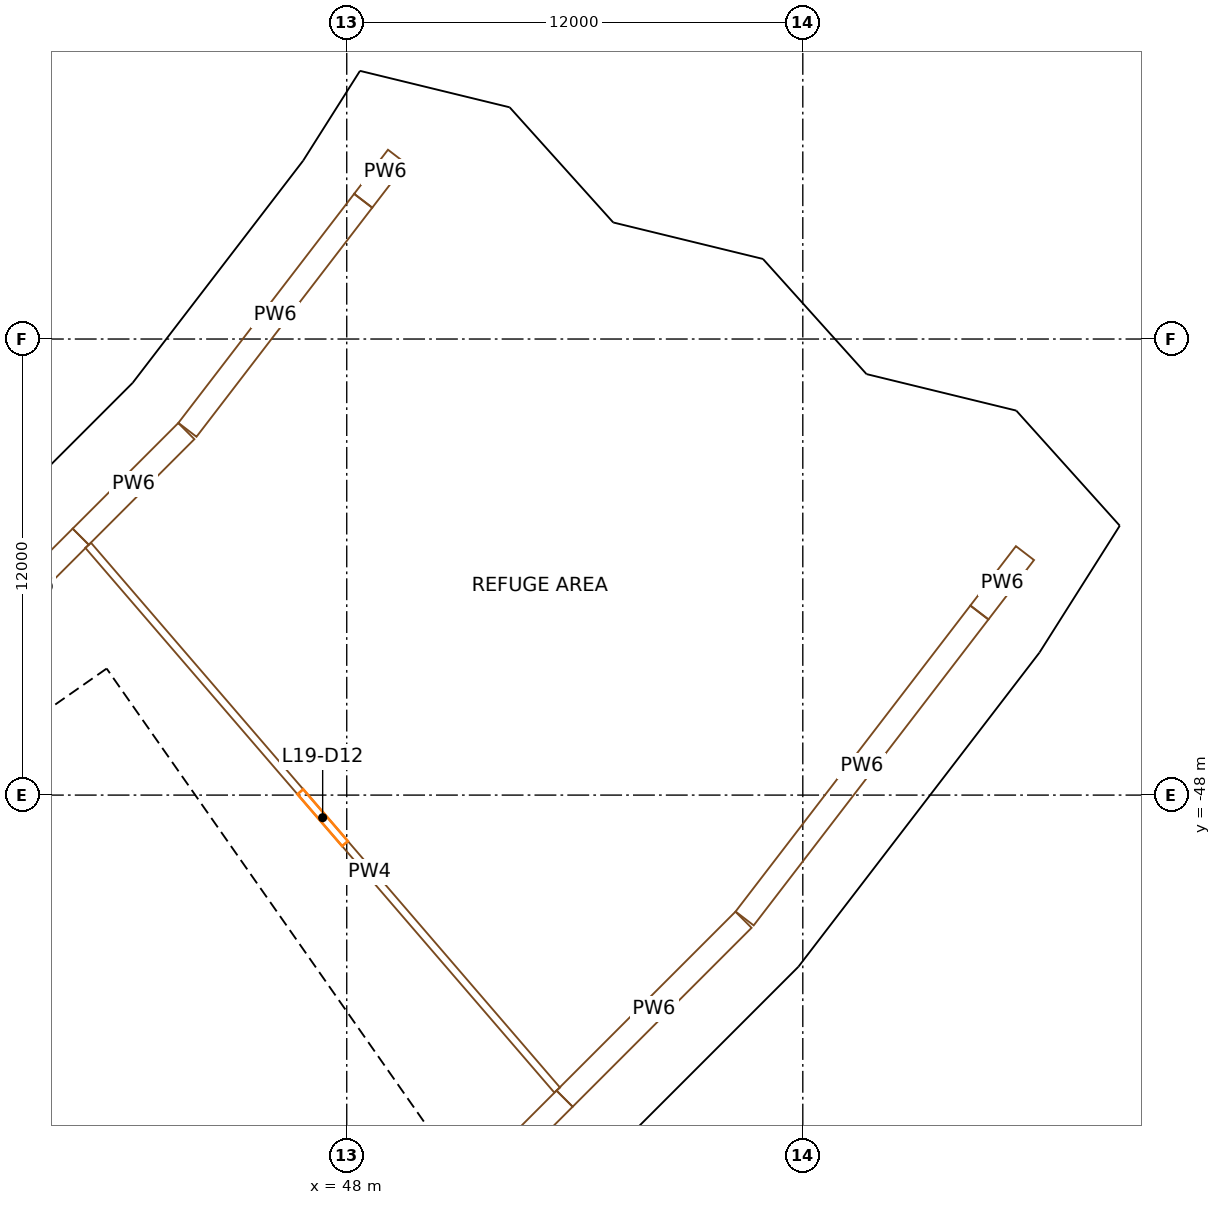
"""IFC4 building model, lengths in metres.
Left out: names, types, materials, properties, quantities, classifications, styles, units other than length and angle.
Written with IfcOpenShell. Run it as: python <this file> out.ifc"""

import sys

from ifc_helpers import new_model, si_unit, direction, frame, frame_2d, origin, origin_2d, place, context, subcontext, project, spatial, rectangle, extrude, element, fill, save


model = new_model("IFC4")
c1 = context("Model", 3, precision=1e-05, world=origin(), true_north=direction((0.0, 1.0)))
c2 = subcontext(c1, "Body", "Model", "MODEL_VIEW")
j1 = project(units=[si_unit("LENGTHUNIT", "METRE"), si_unit("PLANEANGLEUNIT", "RADIAN")], contexts=[c1])
p1 = place(None, origin())
s1 = spatial("IfcSite", under=j1, at=p1, CompositionType="ELEMENT")
p2 = place(p1, origin())
s2 = spatial("IfcBuilding", under=s1, at=p2, CompositionType="ELEMENT")
p3 = place(p2, frame((0.0, 0.0, 89.9)))
s3 = spatial("IfcBuildingStorey", under=s2, at=p3, CompositionType="ELEMENT", Elevation=89.9)
for number, where, z_axis, x_axis in (
    (1, (43.795, -38.407, 0.0), (0.0, 0.0, 1.0), (0.659, 0.752, 0.0)),
    (2, (58.456, -51.264, 0.0), (0.0, 0.0, 1.0), (0.659, 0.752, 0.0)),
    (3, (48.433, -32.362, 0.0), (0.0, 0.0, 1.0), (0.556, 0.831, 0.0)),
    (4, (64.647, -43.196, 0.0), (0.0, 0.0, 1.0), (0.556, 0.831, 0.0)),
):
    element("IfcColumn", number, at=place(p3, frame(where, z_axis=z_axis, x_axis=x_axis)), inside=s3, PredefinedType="COLUMN", context=c2, shape_type="SweptSolid", body=[
        extrude(rectangle(XDim=1.3, YDim=1.7, at=origin_2d()), origin(), (0.0, 0.0, 1.0), 5.0),
    ])
p4 = place(p3, frame((49.779, -57.191, 0.0), z_axis=(0.0, 0.0, 1.0), x_axis=(-0.573577477574, 0.819151315216, 0.0)))
e5 = element("IfcWall", 5, at=p4, inside=s3, PredefinedType="SHEAR", context=c2, shape_type="SweptSolid", body=[
    extrude(rectangle(XDim=14.8, YDim=0.9, at=frame_2d((7.4, 0.0))), origin(), (0.0, 0.0, 1.0), 4.7),
])
p5 = place(p4, frame((6.7, 0.0, 0.0)))
e6 = element("IfcOpeningElement", 6, at=p5, cuts=e5, PredefinedType="OPENING", context=c2, shape_type="SweptSolid", body=[
    extrude(rectangle(XDim=1.4, YDim=2.1, at=frame_2d((0.7, 1.05))), frame((0.0, 0.46, 0.0), z_axis=(0.0, -1.0, 0.0), x_axis=(1.0, 0.0, 0.0)), (0.0, 0.0, 1.0), 0.92),
])
p6 = place(p3, frame((28.854, -54.324, 0.0), z_axis=(0.0, 0.0, 1.0), x_axis=(0.819145767589, 0.573585400304, 0.0)))
e7 = element("IfcWall", 7, at=p6, inside=s3, PredefinedType="SHEAR", context=c2, shape_type="SweptSolid", body=[
    extrude(rectangle(XDim=15.045, YDim=0.9, at=frame_2d((7.523, 0.0))), origin(), (0.0, 0.0, 1.0), 4.7),
])
p7 = place(p6, frame((3.45, 0.0, 0.0)))
e8 = element("IfcOpeningElement", 8, at=p7, cuts=e7, PredefinedType="OPENING", context=c2, shape_type="SweptSolid", body=[
    extrude(rectangle(XDim=1.0, YDim=2.1, at=frame_2d((0.5, 1.05))), frame((0.0, 0.46, 0.0), z_axis=(0.0, -1.0, 0.0), x_axis=(1.0, 0.0, 0.0)), (0.0, 0.0, 1.0), 0.92),
])
p8 = place(p6, frame((13.495, 0.0, 0.0)))
e9 = element("IfcOpeningElement", 9, at=p8, cuts=e7, PredefinedType="OPENING", context=c2, shape_type="SweptSolid", body=[
    extrude(rectangle(XDim=1.1, YDim=2.1, at=frame_2d((0.55, 1.05))), frame((0.0, 0.46, 0.0), z_axis=(0.0, -1.0, 0.0), x_axis=(1.0, 0.0, 0.0)), (0.0, 0.0, 1.0), 0.92),
])
p9 = place(p3, frame((43.204, -60.696, 0.0), z_axis=(0.0, 0.0, 1.0), x_axis=(-0.573571992966, 0.819155155563, 0.0)))
e10 = element("IfcWall", 10, at=p9, inside=s3, PredefinedType="SOLIDWALL", context=c2, shape_type="SweptSolid", body=[
    extrude(rectangle(XDim=13.0, YDim=0.3, at=frame_2d((6.5, 0.0))), origin(), (0.0, 0.0, 1.0), 4.7),
])
p10 = place(p3, frame((33.787, -61.369, 0.0), z_axis=(0.0, 0.0, 1.0), x_axis=(0.819152564888, 0.573575692858, 0.0)))
e11 = element("IfcWall", 11, at=p10, inside=s3, PredefinedType="SOLIDWALL", context=c2, shape_type="SweptSolid", body=[
    extrude(rectangle(XDim=7.95, YDim=0.3, at=frame_2d((3.975, 0.0))), origin(), (0.0, 0.0, 1.0), 4.7),
])
p11 = place(p10, frame((2.1, 0.0, 0.0)))
e12 = element("IfcOpeningElement", 12, at=p11, cuts=e11, PredefinedType="OPENING", context=c2, shape_type="SweptSolid", body=[
    extrude(rectangle(XDim=1.0, YDim=2.1, at=frame_2d((0.5, 1.05))), frame((0.0, 0.16, 0.0), z_axis=(0.0, -1.0, 0.0), x_axis=(1.0, 0.0, 0.0)), (0.0, 0.0, 1.0), 0.32),
])
p12 = place(p3, frame((37.936, -52.91, 0.0), z_axis=(0.0, 0.0, 1.0), x_axis=(0.819147518138, 0.57358290031, 0.0)))
e13 = element("IfcWall", 13, at=p12, inside=s3, PredefinedType="SOLIDWALL", context=c2, shape_type="SweptSolid", body=[
    extrude(rectangle(XDim=6.795, YDim=0.3, at=frame_2d((3.398, 0.0))), origin(), (0.0, 0.0, 1.0), 4.7),
])
p13 = place(p12, frame((5.32, 0.0, 0.0)))
e14 = element("IfcOpeningElement", 14, at=p13, cuts=e13, PredefinedType="OPENING", context=c2, shape_type="SweptSolid", body=[
    extrude(rectangle(XDim=1.1, YDim=2.1, at=frame_2d((0.55, 1.05))), frame((0.0, 0.16, 0.0), z_axis=(0.0, -1.0, 0.0), x_axis=(1.0, 0.0, 0.0)), (0.0, 0.0, 1.0), 0.32),
])
p14 = place(p3, frame((41.262, -57.661, 0.0), z_axis=(0.0, 0.0, 1.0), x_axis=(0.819164398642, 0.573558792102, 0.0)))
e15 = element("IfcWall", 15, at=p14, inside=s3, PredefinedType="SOLIDWALL", context=c2, shape_type="SweptSolid", body=[
    extrude(rectangle(XDim=6.795, YDim=0.3, at=frame_2d((3.397, 0.0))), origin(), (0.0, 0.0, 1.0), 4.7),
])
p15 = place(p14, frame((5.32, 0.0, 0.0)))
e16 = element("IfcOpeningElement", 16, at=p15, cuts=e15, PredefinedType="OPENING", context=c2, shape_type="SweptSolid", body=[
    extrude(rectangle(XDim=1.1, YDim=2.1, at=frame_2d((0.55, 1.05))), frame((0.0, 0.16, 0.0), z_axis=(0.0, -1.0, 0.0), x_axis=(1.0, 0.0, 0.0)), (0.0, 0.0, 1.0), 0.32),
])
p16 = place(p3, frame((39.599, -55.285, 0.0), z_axis=(0.0, 0.0, 1.0), x_axis=(0.819136323161, 0.573598887793, 0.0)))
e17 = element("IfcWall", 17, at=p16, inside=s3, PredefinedType="SOLIDWALL", context=c2, shape_type="SweptSolid", body=[
    extrude(rectangle(XDim=3.0, YDim=0.5, at=frame_2d((1.5, 0.0))), origin(), (0.0, 0.0, 1.0), 4.7),
])
p17 = place(p3, frame((43.757, -55.731, 0.0), z_axis=(0.0, 0.0, 1.0), x_axis=(-0.573536818435, 0.819179783625, 0.0)))
e18 = element("IfcWall", 18, at=p17, inside=s3, PredefinedType="SOLIDWALL", context=c2, shape_type="SweptSolid", body=[
    extrude(rectangle(XDim=5.5, YDim=0.3, at=frame_2d((2.75, 0.0))), origin(), (0.0, 0.0, 1.0), 4.7),
])
p18 = place(p17, frame((0.7, 0.0, 0.0)))
e19 = element("IfcOpeningElement", 19, at=p18, cuts=e18, PredefinedType="OPENING", context=c2, shape_type="SweptSolid", body=[
    extrude(rectangle(XDim=1.1, YDim=2.1, at=frame_2d((0.55, 1.05))), frame((0.0, 0.16, 0.0), z_axis=(0.0, -1.0, 0.0), x_axis=(1.0, 0.0, 0.0)), (0.0, 0.0, 1.0), 0.32),
])
p19 = place(p17, frame((3.7, 0.0, 0.0)))
e20 = element("IfcOpeningElement", 20, at=p19, cuts=e18, PredefinedType="OPENING", context=c2, shape_type="SweptSolid", body=[
    extrude(rectangle(XDim=1.1, YDim=2.1, at=frame_2d((0.55, 1.05))), frame((0.0, 0.16, 0.0), z_axis=(0.0, -1.0, 0.0), x_axis=(1.0, 0.0, 0.0)), (0.0, 0.0, 1.0), 0.32),
])
p20 = place(p3, frame((41.3, -47.96, 0.0), z_axis=(0.0, 0.0, 1.0), x_axis=(0.573495128918, -0.819208970354, 0.0)))
e21 = element("IfcWall", 21, at=p20, inside=s3, PredefinedType="SOLIDWALL", context=c2, shape_type="SweptSolid", body=[
    extrude(rectangle(XDim=0.5, YDim=0.3, at=frame_2d((0.25, 0.0))), origin(), (0.0, 0.0, 1.0), 2.3),
])
p21 = place(p3, frame((46.778, -55.782, 0.0), z_axis=(0.0, 0.0, 1.0), x_axis=(0.573822822947, -0.818979467304, 0.0)))
e22 = element("IfcWall", 22, at=p21, inside=s3, PredefinedType="SOLIDWALL", context=c2, shape_type="SweptSolid", body=[
    extrude(rectangle(XDim=0.5, YDim=0.3, at=frame_2d((0.25, 0.0))), origin(), (0.0, 0.0, 1.0), 2.3),
])
p22 = place(p3, frame((67.927, -40.752, 0.0), z_axis=(0.0, 0.0, 1.0), x_axis=(-0.668632717238, 0.743592825032, 0.0)))
e23 = element("IfcWall", 23, at=p22, inside=s3, PredefinedType="SOLIDWALL", context=c2, shape_type="SweptSolid", body=[
    extrude(rectangle(XDim=3.413, YDim=0.4, at=frame_2d((1.707, 0.0))), origin(), (0.0, 0.0, 1.0), 3.6),
])
p23 = place(p3, frame((65.616, -38.088, 0.0), z_axis=(0.0, 0.0, 1.0), x_axis=(-0.971569694649, 0.236753729518, 0.0)))
e24 = element("IfcWall", 24, at=p23, inside=s3, PredefinedType="SOLIDWALL", context=c2, shape_type="SweptSolid", body=[
    extrude(rectangle(XDim=4.275, YDim=0.4, at=frame_2d((2.138, 0.0))), origin(), (0.0, 0.0, 1.0), 3.6),
])
p24 = place(p3, frame((61.433, -36.951, 0.0), z_axis=(0.0, 0.0, 1.0), x_axis=(-0.66870725962, 0.74352579036, 0.0)))
e25 = element("IfcWall", 25, at=p24, inside=s3, PredefinedType="SOLIDWALL", context=c2, shape_type="SweptSolid", body=[
    extrude(rectangle(XDim=3.668, YDim=0.4, at=frame_2d((1.834, 0.0))), origin(), (0.0, 0.0, 1.0), 3.6),
])
p25 = place(p3, frame((58.951, -34.099, 0.0), z_axis=(0.0, 0.0, 1.0), x_axis=(-0.97158316365, 0.236698449745, 0.0)))
e26 = element("IfcWall", 26, at=p25, inside=s3, PredefinedType="SOLIDWALL", context=c2, shape_type="SweptSolid", body=[
    extrude(rectangle(XDim=4.274, YDim=0.4, at=frame_2d((2.137, 0.0))), origin(), (0.0, 0.0, 1.0), 3.6),
])
p26 = place(p3, frame((54.769, -32.962, 0.0), z_axis=(0.0, 0.0, 1.0), x_axis=(-0.668791930539, 0.743449630874, 0.0)))
e27 = element("IfcWall", 27, at=p26, inside=s3, PredefinedType="SOLIDWALL", context=c2, shape_type="SweptSolid", body=[
    extrude(rectangle(XDim=3.669, YDim=0.4, at=frame_2d((1.834, 0.0))), origin(), (0.0, 0.0, 1.0), 3.6),
])
p27 = place(p3, frame((52.286, -30.109, 0.0), z_axis=(0.0, 0.0, 1.0), x_axis=(-0.971599606195, 0.236630947347, 0.0)))
e28 = element("IfcWall", 28, at=p27, inside=s3, PredefinedType="SOLIDWALL", context=c2, shape_type="SweptSolid", body=[
    extrude(rectangle(XDim=4.147, YDim=0.4, at=frame_2d((2.074, 0.0))), origin(), (0.0, 0.0, 1.0), 3.6),
])
p28 = place(p3, frame((42.481, -37.322, 0.0), z_axis=(0.0, 0.0, 1.0), x_axis=(-0.707106781187, -0.707106781187, 0.0)))
e29 = element("IfcWall", 29, at=p28, inside=s3, PredefinedType="SOLIDWALL", context=c2, shape_type="SweptSolid", body=[
    extrude(rectangle(XDim=7.295, YDim=0.4, at=frame_2d((3.648, 0.0))), origin(), (0.0, 0.0, 1.0), 3.6),
])
p29 = place(p3, frame((47.03, -31.405, 0.0), z_axis=(0.0, 0.0, 1.0), x_axis=(-0.60873951703, -0.793370153463, 0.0)))
e30 = element("IfcWall", 30, at=p29, inside=s3, PredefinedType="SOLIDWALL", context=c2, shape_type="SweptSolid", body=[
    extrude(rectangle(XDim=7.438, YDim=0.4, at=frame_2d((3.719, 0.0))), origin(), (0.0, 0.0, 1.0), 3.6),
])
p30 = place(p3, frame((48.307, -29.384, 0.0), z_axis=(0.0, 0.0, 1.0), x_axis=(-0.534817117293, -0.844967840246, 0.0)))
e31 = element("IfcWall", 31, at=p30, inside=s3, PredefinedType="SOLIDWALL", context=c2, shape_type="SweptSolid", body=[
    extrude(rectangle(XDim=2.373, YDim=0.4, at=frame_2d((1.187, 0.0))), origin(), (0.0, 0.0, 1.0), 3.6),
])
p31 = place(p3, frame((52.367, -59.751, 0.0), z_axis=(0.0, 0.0, 1.0), x_axis=(0.707106781187, 0.707106781187, 0.0)))
e32 = element("IfcWall", 32, at=p31, inside=s3, PredefinedType="SOLIDWALL", context=c2, shape_type="SweptSolid", body=[
    extrude(rectangle(XDim=10.443, YDim=0.4, at=frame_2d((5.221, 0.0))), origin(), (0.0, 0.0, 1.0), 3.6),
])
p32 = place(p3, frame((59.764, -52.344, 0.0), z_axis=(0.0, 0.0, 1.0), x_axis=(0.608759161383, 0.793355080296, 0.0)))
e33 = element("IfcWall", 33, at=p32, inside=s3, PredefinedType="SOLIDWALL", context=c2, shape_type="SweptSolid", body=[
    extrude(rectangle(XDim=10.308, YDim=0.4, at=frame_2d((5.154, 0.0))), origin(), (0.0, 0.0, 1.0), 3.6),
])
p33 = place(p3, frame((66.052, -44.154, 0.0), z_axis=(0.0, 0.0, 1.0), x_axis=(0.534745755468, 0.845013004047, 0.0)))
e34 = element("IfcWall", 34, at=p33, inside=s3, PredefinedType="SOLIDWALL", context=c2, shape_type="SweptSolid", body=[
    extrude(rectangle(XDim=4.001, YDim=0.4, at=frame_2d((2.0, 0.0))), origin(), (0.0, 0.0, 1.0), 3.6),
])
p34 = place(p3, frame((38.423, -43.779, 0.0), z_axis=(0.0, 0.0, 1.0), x_axis=(0.707140265585, 0.707073295203, 0.0)))
e35 = element("IfcWall", 35, at=p34, inside=s3, PredefinedType="PARTITIONING", context=c2, shape_type="SweptSolid", body=[
    extrude(rectangle(XDim=3.646, YDim=0.6, at=frame_2d((1.823, 0.0))), origin(), (0.0, 0.0, 1.0), 3.6),
])
p35 = place(p3, frame((41.001, -41.201, 0.0), z_axis=(0.0, 0.0, 1.0), x_axis=(0.707075708448, 0.70713785256, 0.0)))
e36 = element("IfcWall", 36, at=p35, inside=s3, PredefinedType="PARTITIONING", context=c2, shape_type="SweptSolid", body=[
    extrude(rectangle(XDim=3.929, YDim=0.6, at=frame_2d((1.964, 0.0))), origin(), (0.0, 0.0, 1.0), 3.6),
])
p36 = place(p3, frame((41.196, -41.428, 0.0), z_axis=(0.0, 0.0, 1.0), x_axis=(0.652481130337, -0.757804971318, 0.0)))
e37 = element("IfcWall", 37, at=p36, inside=s3, PredefinedType="PARTITIONING", context=c2, shape_type="SweptSolid", body=[
    extrude(rectangle(XDim=18.913, YDim=0.2, at=frame_2d((9.456, 0.0))), origin(), (0.0, 0.0, 1.0), 3.6),
])
p37 = place(p36, frame((8.556, 0.0, 0.0)))
e38 = element("IfcOpeningElement", 38, at=p37, cuts=e37, PredefinedType="OPENING", context=c2, shape_type="SweptSolid", body=[
    extrude(rectangle(XDim=1.8, YDim=2.4, at=frame_2d((0.9, 1.2))), frame((0.0, 0.11, 0.0), z_axis=(0.0, -1.0, 0.0), x_axis=(1.0, 0.0, 0.0)), (0.0, 0.0, 1.0), 0.22),
])
p38 = place(p3, frame((43.808, -38.389, 0.0), z_axis=(0.0, 0.0, 1.0), x_axis=(0.608775025132, 0.793342907434, 0.0)))
e39 = element("IfcWall", 39, at=p38, inside=s3, PredefinedType="PARTITIONING", context=c2, shape_type="SweptSolid", body=[
    extrude(rectangle(XDim=7.594, YDim=0.6, at=frame_2d((3.797, 0.0))), origin(), (0.0, 0.0, 1.0), 3.6),
])
p39 = place(p3, frame((48.435, -32.36, 0.0), z_axis=(0.0, 0.0, 1.0), x_axis=(0.608747741754, 0.793363842704, 0.0)))
e40 = element("IfcWall", 40, at=p39, inside=s3, PredefinedType="PARTITIONING", context=c2, shape_type="SweptSolid", body=[
    extrude(rectangle(XDim=1.459, YDim=0.6, at=frame_2d((0.729, 0.0))), origin(), (0.0, 0.0, 1.0), 3.6),
])
p40 = place(p3, frame((51.28, -58.439, 0.0), z_axis=(0.0, 0.0, 1.0), x_axis=(0.707106781187, 0.707106781187, 0.0)))
e41 = element("IfcWall", 41, at=p40, inside=s3, PredefinedType="PARTITIONING", context=c2, shape_type="SweptSolid", body=[
    extrude(rectangle(XDim=3.468, YDim=0.6, at=frame_2d((1.734, 0.0))), origin(), (0.0, 0.0, 1.0), 3.6),
])
p41 = place(p3, frame((53.732, -55.988, 0.0), z_axis=(0.0, 0.0, 1.0), x_axis=(0.707106781187, 0.707106781187, 0.0)))
e42 = element("IfcWall", 42, at=p41, inside=s3, PredefinedType="PARTITIONING", context=c2, shape_type="SweptSolid", body=[
    extrude(rectangle(XDim=6.657, YDim=0.6, at=frame_2d((3.329, 0.0))), origin(), (0.0, 0.0, 1.0), 3.6),
])
p42 = place(p3, frame((58.469, -51.246, 0.0), z_axis=(0.0, 0.0, 1.0), x_axis=(0.608777573681, 0.793340951787, 0.0)))
e43 = element("IfcWall", 43, at=p42, inside=s3, PredefinedType="PARTITIONING", context=c2, shape_type="SweptSolid", body=[
    extrude(rectangle(XDim=10.145, YDim=0.6, at=frame_2d((5.072, 0.0))), origin(), (0.0, 0.0, 1.0), 3.6),
])
p43 = place(p3, frame((64.649, -43.193, 0.0), z_axis=(0.0, 0.0, 1.0), x_axis=(0.608744279495, 0.793366499281, 0.0)))
e44 = element("IfcWall", 44, at=p43, inside=s3, PredefinedType="PARTITIONING", context=c2, shape_type="SweptSolid", body=[
    extrude(rectangle(XDim=1.966, YDim=0.6, at=frame_2d((0.983, 0.0))), origin(), (0.0, 0.0, 1.0), 3.6),
])
p44 = place(p18, origin())
e45 = element("IfcDoor", 45, at=p44, inside=s3, OperationType="DOUBLE_DOOR_SLIDING", PredefinedType="DOOR", context=c2, shape_type="SweptSolid", body=[
    extrude(rectangle(XDim=1.1, YDim=2.1, at=frame_2d((0.55, 1.05))), frame((0.0, 0.025, 0.0), z_axis=(0.0, -1.0, 0.0), x_axis=(1.0, 0.0, 0.0)), (0.0, 0.0, 1.0), 0.05),
])
fill(e19, e45)
p45 = place(p19, origin())
e46 = element("IfcDoor", 46, at=p45, inside=s3, OperationType="DOUBLE_DOOR_SLIDING", PredefinedType="DOOR", context=c2, shape_type="SweptSolid", body=[
    extrude(rectangle(XDim=1.1, YDim=2.1, at=frame_2d((0.55, 1.05))), frame((0.0, 0.025, 0.0), z_axis=(0.0, -1.0, 0.0), x_axis=(1.0, 0.0, 0.0)), (0.0, 0.0, 1.0), 0.05),
])
fill(e20, e46)
p46 = place(p5, origin())
e47 = element("IfcDoor", 47, at=p46, inside=s3, OperationType="DOUBLE_DOOR_SINGLE_SWING", PredefinedType="DOOR", context=c2, shape_type="SweptSolid", body=[
    extrude(rectangle(XDim=1.4, YDim=2.1, at=frame_2d((0.7, 1.05))), frame((0.0, 0.025, 0.0), z_axis=(0.0, -1.0, 0.0), x_axis=(1.0, 0.0, 0.0)), (0.0, 0.0, 1.0), 0.05),
])
fill(e6, e47)
p47 = place(p8, origin())
e48 = element("IfcDoor", 48, at=p47, inside=s3, OperationType="SINGLE_SWING_RIGHT", PredefinedType="DOOR", context=c2, shape_type="SweptSolid", body=[
    extrude(rectangle(XDim=1.1, YDim=2.1, at=frame_2d((0.55, 1.05))), frame((0.0, 0.025, 0.0), z_axis=(0.0, -1.0, 0.0), x_axis=(1.0, 0.0, 0.0)), (0.0, 0.0, 1.0), 0.05),
])
fill(e9, e48)
p48 = place(p13, origin())
e49 = element("IfcDoor", 49, at=p48, inside=s3, OperationType="SINGLE_SWING_RIGHT", PredefinedType="DOOR", context=c2, shape_type="SweptSolid", body=[
    extrude(rectangle(XDim=1.1, YDim=2.1, at=frame_2d((0.55, 1.05))), frame((0.0, 0.025, 0.0), z_axis=(0.0, -1.0, 0.0), x_axis=(1.0, 0.0, 0.0)), (0.0, 0.0, 1.0), 0.05),
])
fill(e14, e49)
p49 = place(p15, origin())
e50 = element("IfcDoor", 50, at=p49, inside=s3, OperationType="SINGLE_SWING_RIGHT", PredefinedType="DOOR", context=c2, shape_type="SweptSolid", body=[
    extrude(rectangle(XDim=1.1, YDim=2.1, at=frame_2d((0.55, 1.05))), frame((0.0, 0.025, 0.0), z_axis=(0.0, -1.0, 0.0), x_axis=(1.0, 0.0, 0.0)), (0.0, 0.0, 1.0), 0.05),
])
fill(e16, e50)
p50 = place(p37, origin())
e51 = element("IfcDoor", 51, at=p50, inside=s3, OperationType="DOUBLE_DOOR_SINGLE_SWING", PredefinedType="DOOR", context=c2, shape_type="SweptSolid", body=[
    extrude(rectangle(XDim=1.8, YDim=2.4, at=frame_2d((0.9, 1.2))), frame((0.0, 0.025, 0.0), z_axis=(0.0, -1.0, 0.0), x_axis=(1.0, 0.0, 0.0)), (0.0, 0.0, 1.0), 0.05),
])
fill(e38, e51)
save(model, sys.argv[1])
